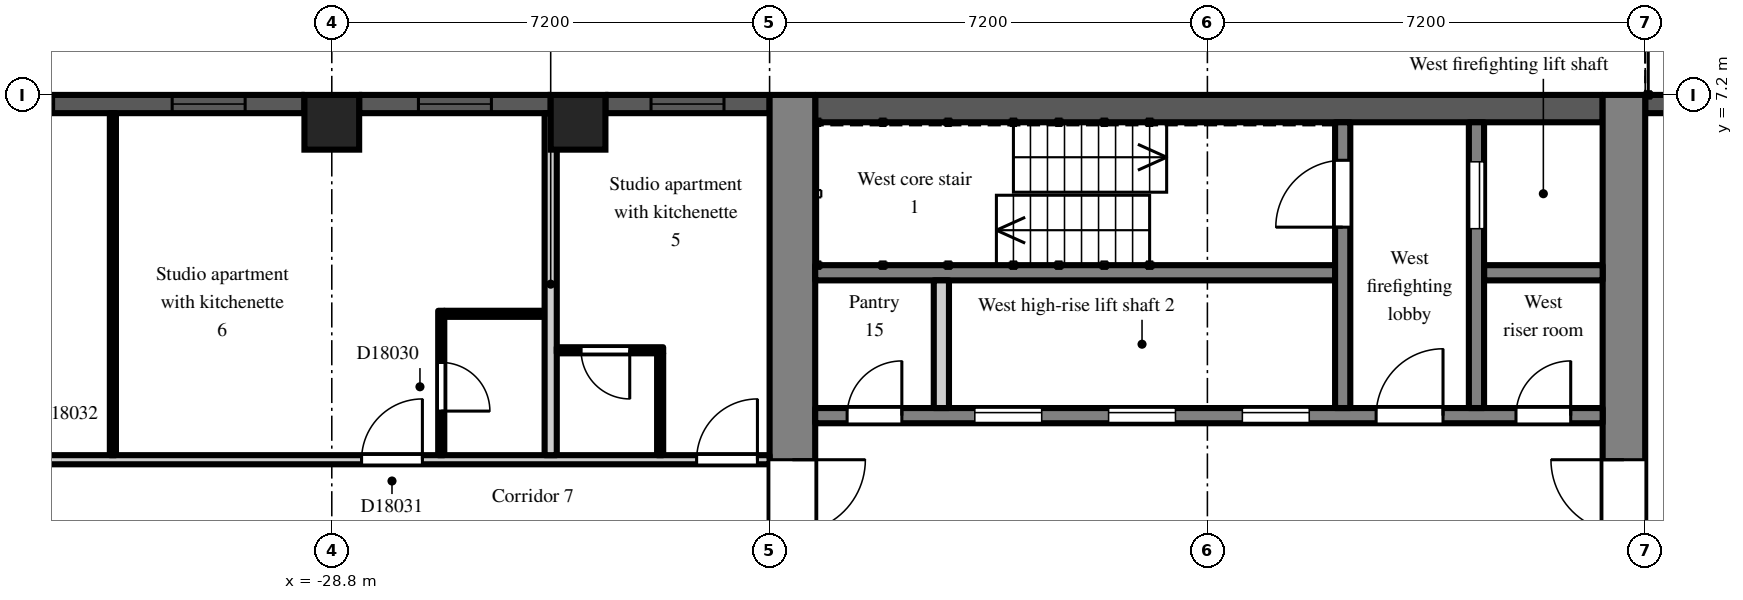
"""IFC4 building model, lengths in metres.
Left out: names, types, materials, properties, quantities, classifications, styles, units other than length and angle.
Written with IfcOpenShell. Run it as: python <this file> out.ifc"""

import sys

from ifc_helpers import new_model, si_unit, direction, frame, frame_2d, origin, origin_2d, place, context, subcontext, project, spatial, rectangle, extrude, element, fill, save


model = new_model("IFC4")
c1 = context("Model", 3, precision=1e-05, world=origin(), true_north=direction((0.0, 1.0)))
c2 = subcontext(c1, "Body", "Model", "MODEL_VIEW")
j1 = project(units=[si_unit("LENGTHUNIT", "METRE"), si_unit("PLANEANGLEUNIT", "RADIAN")], contexts=[c1])
p1 = place(None, origin())
s1 = spatial("IfcSite", under=j1, at=p1, CompositionType="ELEMENT")
p2 = place(p1, origin())
s2 = spatial("IfcBuilding", under=s1, at=p2, CompositionType="ELEMENT")
p3 = place(p2, frame((0.0, 0.0, 123.3)))
s3 = spatial("IfcBuildingStorey", under=s2, at=p3, CompositionType="ELEMENT", Elevation=123.3)
for number, where, z_axis, x_axis in (
    (1, (-28.8, 6.75, 0.0), (0.0, 0.0, 1.0), (1.0, 0.0, 0.0)),
    (2, (-24.75, 6.75, 0.0), (0.0, 0.0, 1.0), (1.0, 0.0, 0.0)),
):
    element("IfcColumn", number, at=place(p3, frame(where, z_axis=z_axis, x_axis=x_axis)), inside=s3, PredefinedType="COLUMN", context=c2, shape_type="SweptSolid", body=[
        extrude(rectangle(XDim=0.9, YDim=0.9, at=origin_2d()), origin(), (0.0, 0.0, 1.0), 3.0),
    ])
p4 = place(p3, frame((-4.2, 7.05, 0.0), z_axis=(0.0, 0.0, 1.0), x_axis=(-1.0, 0.0, 0.0)))
e3 = element("IfcWall", 3, at=p4, inside=s3, PredefinedType="SOLIDWALL", context=c2, shape_type="SweptSolid", body=[
    extrude(rectangle(XDim=3.0, YDim=0.3, at=frame_2d((1.5, 0.0))), origin(), (0.0, 0.0, 1.0), 2.2),
])
p5 = place(p3, frame((-21.6, 7.05, 0.0), z_axis=(0.0, 0.0, 1.0), x_axis=(-1.0, 0.0, 0.0)))
e4 = element("IfcWall", 4, at=p5, inside=s3, PredefinedType="SOLIDWALL", context=c2, shape_type="SweptSolid", body=[
    extrude(rectangle(XDim=2.7, YDim=0.3, at=frame_2d((1.35, 0.0))), origin(), (0.0, 0.0, 1.0), 2.2),
])
p6 = place(p5, frame((0.75, 0.0, 0.2)))
e5 = element("IfcOpeningElement", 5, at=p6, cuts=e4, PredefinedType="OPENING", context=c2, shape_type="SweptSolid", body=[
    extrude(rectangle(XDim=1.2, YDim=1.85, at=frame_2d((0.6, 0.925))), frame((0.0, 0.16, 0.0), z_axis=(0.0, -1.0, 0.0), x_axis=(1.0, 0.0, 0.0)), (0.0, 0.0, 1.0), 0.32),
])
p7 = place(p3, frame((-25.2, 7.05, 0.0), z_axis=(0.0, 0.0, 1.0), x_axis=(-1.0, 0.0, 0.0)))
e6 = element("IfcWall", 6, at=p7, inside=s3, PredefinedType="SOLIDWALL", context=c2, shape_type="SweptSolid", body=[
    extrude(rectangle(XDim=3.15, YDim=0.3, at=frame_2d((1.575, 0.0))), origin(), (0.0, 0.0, 1.0), 2.2),
])
p8 = place(p7, frame((0.975, 0.0, 0.2)))
e7 = element("IfcOpeningElement", 7, at=p8, cuts=e6, PredefinedType="OPENING", context=c2, shape_type="SweptSolid", body=[
    extrude(rectangle(XDim=1.2, YDim=1.85, at=frame_2d((0.6, 0.925))), frame((0.0, 0.16, 0.0), z_axis=(0.0, -1.0, 0.0), x_axis=(1.0, 0.0, 0.0)), (0.0, 0.0, 1.0), 0.32),
])
p9 = place(p3, frame((-29.25, 7.05, 0.0), z_axis=(0.0, 0.0, 1.0), x_axis=(-1.0, 0.0, 0.0)))
e8 = element("IfcWall", 8, at=p9, inside=s3, PredefinedType="SOLIDWALL", context=c2, shape_type="SweptSolid", body=[
    extrude(rectangle(XDim=6.3, YDim=0.3, at=frame_2d((3.15, 0.0))), origin(), (0.0, 0.0, 1.0), 2.2),
])
p10 = place(p9, frame((0.975, 0.0, 0.2)))
e9 = element("IfcOpeningElement", 9, at=p10, cuts=e8, PredefinedType="OPENING", context=c2, shape_type="SweptSolid", body=[
    extrude(rectangle(XDim=1.2, YDim=1.85, at=frame_2d((0.6, 0.925))), frame((0.0, 0.16, 0.0), z_axis=(0.0, -1.0, 0.0), x_axis=(1.0, 0.0, 0.0)), (0.0, 0.0, 1.0), 0.32),
])
p11 = place(p9, frame((4.125, 0.0, 0.2)))
e10 = element("IfcOpeningElement", 10, at=p11, cuts=e8, PredefinedType="OPENING", context=c2, shape_type="SweptSolid", body=[
    extrude(rectangle(XDim=1.2, YDim=1.85, at=frame_2d((0.6, 0.925))), frame((0.0, 0.16, 0.0), z_axis=(0.0, -1.0, 0.0), x_axis=(1.0, 0.0, 0.0)), (0.0, 0.0, 1.0), 0.32),
])
p12 = place(p3, frame((-7.55, -7.2, 0.0), z_axis=(0.0, 0.0, 1.0), x_axis=(0.0, 1.0, 0.0)))
e11 = element("IfcWall", 11, at=p12, inside=s3, PredefinedType="SHEAR", context=c2, shape_type="SweptSolid", body=[
    extrude(rectangle(XDim=14.4, YDim=0.7, at=frame_2d((7.2, 0.0))), origin(), (0.0, 0.0, 1.0), 2.6),
])
p13 = place(p12, frame((6.0, 0.0, 0.0)))
e12 = element("IfcOpeningElement", 12, at=p13, cuts=e11, PredefinedType="OPENING", context=c2, shape_type="SweptSolid", body=[
    extrude(rectangle(XDim=2.4, YDim=2.2, at=frame_2d((1.2, 1.1))), frame((0.0, 0.36, 0.0), z_axis=(0.0, -1.0, 0.0), x_axis=(1.0, 0.0, 0.0)), (0.0, 0.0, 1.0), 0.72),
])
p14 = place(p3, frame((-21.225, -7.2, 0.0), z_axis=(0.0, 0.0, 1.0), x_axis=(0.0, 1.0, 0.0)))
e13 = element("IfcWall", 13, at=p14, inside=s3, PredefinedType="SHEAR", context=c2, shape_type="SweptSolid", body=[
    extrude(rectangle(XDim=14.4, YDim=0.75, at=frame_2d((7.2, 0.0))), origin(), (0.0, 0.0, 1.0), 2.6),
])
p15 = place(p14, frame((6.0, 0.0, 0.0)))
e14 = element("IfcOpeningElement", 14, at=p15, cuts=e13, PredefinedType="OPENING", context=c2, shape_type="SweptSolid", body=[
    extrude(rectangle(XDim=2.4, YDim=2.2, at=frame_2d((1.2, 1.1))), frame((0.0, 0.385, 0.0), z_axis=(0.0, -1.0, 0.0), x_axis=(1.0, 0.0, 0.0)), (0.0, 0.0, 1.0), 0.77),
])
p16 = place(p3, frame((-7.9, 6.975, 0.0), z_axis=(0.0, 0.0, 1.0), x_axis=(-1.0, 0.0, 0.0)))
e15 = element("IfcWall", 15, at=p16, inside=s3, PredefinedType="SHEAR", context=c2, shape_type="SweptSolid", body=[
    extrude(rectangle(XDim=12.95, YDim=0.45, at=frame_2d((6.475, 0.0))), origin(), (0.0, 0.0, 1.0), 2.6),
])
p17 = place(p3, frame((-7.9, 1.925, 0.0), z_axis=(0.0, 0.0, 1.0), x_axis=(-1.0, 0.0, 0.0)))
e16 = element("IfcWall", 16, at=p17, inside=s3, PredefinedType="SHEAR", context=c2, shape_type="SweptSolid", body=[
    extrude(rectangle(XDim=12.95, YDim=0.25, at=frame_2d((6.475, 0.0))), origin(), (0.0, 0.0, 1.0), 2.6),
])
p18 = place(p17, frame((4.825, 0.0, 0.0)))
e17 = element("IfcOpeningElement", 17, at=p18, cuts=e16, PredefinedType="OPENING", context=c2, shape_type="SweptSolid", body=[
    extrude(rectangle(XDim=1.1, YDim=2.1, at=frame_2d((0.55, 1.05))), frame((0.0, 0.135, 0.0), z_axis=(0.0, -1.0, 0.0), x_axis=(1.0, 0.0, 0.0)), (0.0, 0.0, 1.0), 0.27),
])
p19 = place(p17, frame((7.025, 0.0, 0.0)))
e18 = element("IfcOpeningElement", 18, at=p19, cuts=e16, PredefinedType="OPENING", context=c2, shape_type="SweptSolid", body=[
    extrude(rectangle(XDim=1.1, YDim=2.1, at=frame_2d((0.55, 1.05))), frame((0.0, 0.135, 0.0), z_axis=(0.0, -1.0, 0.0), x_axis=(1.0, 0.0, 0.0)), (0.0, 0.0, 1.0), 0.27),
])
p20 = place(p17, frame((9.225, 0.0, 0.0)))
e19 = element("IfcOpeningElement", 19, at=p20, cuts=e16, PredefinedType="OPENING", context=c2, shape_type="SweptSolid", body=[
    extrude(rectangle(XDim=1.1, YDim=2.1, at=frame_2d((0.55, 1.05))), frame((0.0, 0.135, 0.0), z_axis=(0.0, -1.0, 0.0), x_axis=(1.0, 0.0, 0.0)), (0.0, 0.0, 1.0), 0.27),
])
p21 = place(p17, frame((0.525, 0.0, 0.0)))
e20 = element("IfcOpeningElement", 20, at=p21, cuts=e16, PredefinedType="OPENING", context=c2, shape_type="SweptSolid", body=[
    extrude(rectangle(XDim=0.9, YDim=2.1, at=frame_2d((0.45, 1.05))), frame((0.0, 0.135, 0.0), z_axis=(0.0, -1.0, 0.0), x_axis=(1.0, 0.0, 0.0)), (0.0, 0.0, 1.0), 0.27),
])
p22 = place(p17, frame((2.625, 0.0, 0.0)))
e21 = element("IfcOpeningElement", 21, at=p22, cuts=e16, PredefinedType="OPENING", context=c2, shape_type="SweptSolid", body=[
    extrude(rectangle(XDim=1.1, YDim=2.1, at=frame_2d((0.55, 1.05))), frame((0.0, 0.135, 0.0), z_axis=(0.0, -1.0, 0.0), x_axis=(1.0, 0.0, 0.0)), (0.0, 0.0, 1.0), 0.27),
])
p23 = place(p17, frame((11.525, 0.0, 0.0)))
e22 = element("IfcOpeningElement", 22, at=p23, cuts=e16, PredefinedType="OPENING", context=c2, shape_type="SweptSolid", body=[
    extrude(rectangle(XDim=0.9, YDim=2.1, at=frame_2d((0.45, 1.05))), frame((0.0, 0.135, 0.0), z_axis=(0.0, -1.0, 0.0), x_axis=(1.0, 0.0, 0.0)), (0.0, 0.0, 1.0), 0.27),
])
p24 = place(p3, frame((-7.9, 4.275, 0.0), z_axis=(0.0, 0.0, 1.0), x_axis=(-1.0, 0.0, 0.0)))
e23 = element("IfcWall", 23, at=p24, inside=s3, PredefinedType="SHEAR", context=c2, shape_type="SweptSolid", body=[
    extrude(rectangle(XDim=1.95, YDim=0.25, at=frame_2d((0.975, 0.0))), origin(), (0.0, 0.0, 1.0), 2.6),
])
p25 = place(p3, frame((-12.3, 4.275, 0.0), z_axis=(0.0, 0.0, 1.0), x_axis=(-1.0, 0.0, 0.0)))
e24 = element("IfcWall", 24, at=p25, inside=s3, PredefinedType="SHEAR", context=c2, shape_type="SweptSolid", body=[
    extrude(rectangle(XDim=8.55, YDim=0.25, at=frame_2d((4.275, 0.0))), origin(), (0.0, 0.0, 1.0), 2.6),
])
p26 = place(p3, frame((-9.975, 2.05, 0.0), z_axis=(0.0, 0.0, 1.0), x_axis=(0.0, 1.0, 0.0)))
e25 = element("IfcWall", 25, at=p26, inside=s3, PredefinedType="SHEAR", context=c2, shape_type="SweptSolid", body=[
    extrude(rectangle(XDim=4.7, YDim=0.25, at=frame_2d((2.35, 0.0))), origin(), (0.0, 0.0, 1.0), 2.6),
])
p27 = place(p26, frame((2.95, 0.0, 0.0)))
e26 = element("IfcOpeningElement", 26, at=p27, cuts=e25, PredefinedType="OPENING", context=c2, shape_type="SweptSolid", body=[
    extrude(rectangle(XDim=1.1, YDim=2.1, at=frame_2d((0.55, 1.05))), frame((0.0, 0.135, 0.0), z_axis=(0.0, -1.0, 0.0), x_axis=(1.0, 0.0, 0.0)), (0.0, 0.0, 1.0), 0.27),
])
p28 = place(p3, frame((-12.175, 2.05, 0.0), z_axis=(0.0, 0.0, 1.0), x_axis=(0.0, 1.0, 0.0)))
e27 = element("IfcWall", 27, at=p28, inside=s3, PredefinedType="SHEAR", context=c2, shape_type="SweptSolid", body=[
    extrude(rectangle(XDim=4.7, YDim=0.25, at=frame_2d((2.35, 0.0))), origin(), (0.0, 0.0, 1.0), 2.6),
])
p29 = place(p28, frame((2.975, 0.0, 0.0)))
e28 = element("IfcOpeningElement", 28, at=p29, cuts=e27, PredefinedType="OPENING", context=c2, shape_type="SweptSolid", body=[
    extrude(rectangle(XDim=1.1, YDim=2.1, at=frame_2d((0.55, 1.05))), frame((0.0, 0.135, 0.0), z_axis=(0.0, -1.0, 0.0), x_axis=(1.0, 0.0, 0.0)), (0.0, 0.0, 1.0), 0.27),
])
p30 = place(p3, frame((-18.775, 2.05, 0.0), z_axis=(0.0, 0.0, 1.0), x_axis=(0.0, 1.0, 0.0)))
e29 = element("IfcWall", 29, at=p30, inside=s3, PredefinedType="PARTITIONING", context=c2, shape_type="SweptSolid", body=[
    extrude(rectangle(XDim=2.1, YDim=0.25, at=frame_2d((1.05, 0.0))), origin(), (0.0, 0.0, 1.0), 2.6),
])
p31 = place(p3, frame((-36.5, 1.2, 0.0), z_axis=(0.0, 0.0, 1.0), x_axis=(1.0, 0.0, 0.0)))
e30 = element("IfcWall", 30, at=p31, inside=s3, PredefinedType="PARTITIONING", context=c2, shape_type="SweptSolid", body=[
    extrude(rectangle(XDim=14.9, YDim=0.15, at=frame_2d((7.45, 0.0))), origin(), (0.0, 0.0, 1.0), 2.6),
])
p32 = place(p31, frame((13.7, 0.0, 0.0)))
e31 = element("IfcOpeningElement", 31, at=p32, cuts=e30, PredefinedType="OPENING", context=c2, shape_type="SweptSolid", body=[
    extrude(rectangle(XDim=1.0, YDim=2.1, at=frame_2d((0.5, 1.05))), frame((0.0, 0.085, 0.0), z_axis=(0.0, -1.0, 0.0), x_axis=(1.0, 0.0, 0.0)), (0.0, 0.0, 1.0), 0.17),
])
p33 = place(p31, frame((8.19, 0.0, 0.0)))
e32 = element("IfcOpeningElement", 32, at=p33, cuts=e30, PredefinedType="OPENING", context=c2, shape_type="SweptSolid", body=[
    extrude(rectangle(XDim=1.0, YDim=2.1, at=frame_2d((0.5, 1.05))), frame((0.0, 0.085, 0.0), z_axis=(0.0, -1.0, 0.0), x_axis=(1.0, 0.0, 0.0)), (0.0, 0.0, 1.0), 0.17),
])
p34 = place(p31, frame((1.15, 0.0, 0.0)))
e33 = element("IfcOpeningElement", 33, at=p34, cuts=e30, PredefinedType="OPENING", context=c2, shape_type="SweptSolid", body=[
    extrude(rectangle(XDim=1.8, YDim=2.1, at=frame_2d((0.9, 1.05))), frame((0.0, 0.085, 0.0), z_axis=(0.0, -1.0, 0.0), x_axis=(1.0, 0.0, 0.0)), (0.0, 0.0, 1.0), 0.17),
])
p35 = place(p3, frame((-32.4, 1.275, 0.0), z_axis=(0.0, 0.0, 1.0), x_axis=(0.0, 1.0, 0.0)))
e34 = element("IfcWall", 34, at=p35, inside=s3, PredefinedType="PARTITIONING", context=c2, shape_type="SweptSolid", body=[
    extrude(rectangle(XDim=5.625, YDim=0.1, at=frame_2d((2.812, 0.0))), origin(), (0.0, 0.0, 1.0), 2.6),
])
p36 = place(p3, frame((-27.0, 1.275, 0.0), z_axis=(0.0, 0.0, 1.0), x_axis=(0.0, 1.0, 0.0)))
e35 = element("IfcWall", 35, at=p36, inside=s3, PredefinedType="PARTITIONING", context=c2, shape_type="SweptSolid", body=[
    extrude(rectangle(XDim=2.375, YDim=0.1, at=frame_2d((1.188, 0.0))), origin(), (0.0, 0.0, 1.0), 2.6),
])
p37 = place(p36, frame((0.725, 0.0, 0.0)))
e36 = element("IfcOpeningElement", 36, at=p37, cuts=e35, PredefinedType="OPENING", context=c2, shape_type="SweptSolid", body=[
    extrude(rectangle(XDim=0.8, YDim=2.1, at=frame_2d((0.4, 1.05))), frame((0.0, 0.06, 0.0), z_axis=(0.0, -1.0, 0.0), x_axis=(1.0, 0.0, 0.0)), (0.0, 0.0, 1.0), 0.12),
])
p38 = place(p3, frame((-26.95, 3.6, 0.0), z_axis=(0.0, 0.0, 1.0), x_axis=(1.0, 0.0, 0.0)))
e37 = element("IfcWall", 37, at=p38, inside=s3, PredefinedType="PARTITIONING", context=c2, shape_type="SweptSolid", body=[
    extrude(rectangle(XDim=1.65, YDim=0.1, at=frame_2d((0.825, 0.0))), origin(), (0.0, 0.0, 1.0), 2.6),
])
p39 = place(p3, frame((-25.2, 1.275, 0.0), z_axis=(0.0, 0.0, 1.0), x_axis=(0.0, 1.0, 0.0)))
e38 = element("IfcWall", 38, at=p39, inside=s3, PredefinedType="PARTITIONING", context=c2, shape_type="SweptSolid", body=[
    extrude(rectangle(XDim=5.625, YDim=0.2, at=frame_2d((2.812, 0.0))), origin(), (0.0, 0.0, 1.0), 2.6),
])
p40 = place(p3, frame((-25.1, 3.0, 0.0), z_axis=(0.0, 0.0, 1.0), x_axis=(1.0, 0.0, 0.0)))
e39 = element("IfcWall", 39, at=p40, inside=s3, PredefinedType="PARTITIONING", context=c2, shape_type="SweptSolid", body=[
    extrude(rectangle(XDim=1.75, YDim=0.1, at=frame_2d((0.875, 0.0))), origin(), (0.0, 0.0, 1.0), 2.6),
])
p41 = place(p40, frame((0.4, 0.0, 0.0)))
e40 = element("IfcOpeningElement", 40, at=p41, cuts=e39, PredefinedType="OPENING", context=c2, shape_type="SweptSolid", body=[
    extrude(rectangle(XDim=0.8, YDim=2.1, at=frame_2d((0.4, 1.05))), frame((0.0, 0.06, 0.0), z_axis=(0.0, -1.0, 0.0), x_axis=(1.0, 0.0, 0.0)), (0.0, 0.0, 1.0), 0.12),
])
p42 = place(p3, frame((-23.4, 1.275, 0.0), z_axis=(0.0, 0.0, 1.0), x_axis=(0.0, 1.0, 0.0)))
e41 = element("IfcWall", 41, at=p42, inside=s3, PredefinedType="PARTITIONING", context=c2, shape_type="SweptSolid", body=[
    extrude(rectangle(XDim=1.675, YDim=0.1, at=frame_2d((0.837, 0.0))), origin(), (0.0, 0.0, 1.0), 2.6),
])
p43 = place(p6, origin())
e42 = element("IfcWindow", 42, at=p43, inside=s3, PartitioningType="SINGLE_PANEL", PredefinedType="WINDOW", context=c2, shape_type="SweptSolid", body=[
    extrude(rectangle(XDim=1.2, YDim=1.85, at=frame_2d((0.6, 0.925))), frame((0.0, 0.03, 0.0), z_axis=(0.0, -1.0, 0.0), x_axis=(1.0, 0.0, 0.0)), (0.0, 0.0, 1.0), 0.06),
])
fill(e5, e42)
p44 = place(p8, origin())
e43 = element("IfcWindow", 43, at=p44, inside=s3, PartitioningType="SINGLE_PANEL", PredefinedType="WINDOW", context=c2, shape_type="SweptSolid", body=[
    extrude(rectangle(XDim=1.2, YDim=1.85, at=frame_2d((0.6, 0.925))), frame((0.0, 0.03, 0.0), z_axis=(0.0, -1.0, 0.0), x_axis=(1.0, 0.0, 0.0)), (0.0, 0.0, 1.0), 0.06),
])
fill(e7, e43)
p45 = place(p10, origin())
e44 = element("IfcWindow", 44, at=p45, inside=s3, PartitioningType="SINGLE_PANEL", PredefinedType="WINDOW", context=c2, shape_type="SweptSolid", body=[
    extrude(rectangle(XDim=1.2, YDim=1.85, at=frame_2d((0.6, 0.925))), frame((0.0, 0.03, 0.0), z_axis=(0.0, -1.0, 0.0), x_axis=(1.0, 0.0, 0.0)), (0.0, 0.0, 1.0), 0.06),
])
fill(e9, e44)
p46 = place(p11, origin())
e45 = element("IfcWindow", 45, at=p46, inside=s3, PartitioningType="SINGLE_PANEL", PredefinedType="WINDOW", context=c2, shape_type="SweptSolid", body=[
    extrude(rectangle(XDim=1.2, YDim=1.85, at=frame_2d((0.6, 0.925))), frame((0.0, 0.03, 0.0), z_axis=(0.0, -1.0, 0.0), x_axis=(1.0, 0.0, 0.0)), (0.0, 0.0, 1.0), 0.06),
])
fill(e10, e45)
p47 = place(p18, origin())
e46 = element("IfcDoor", 46, at=p47, inside=s3, OperationType="SLIDING_TO_LEFT", PredefinedType="DOOR", context=c2, shape_type="SweptSolid", body=[
    extrude(rectangle(XDim=1.1, YDim=2.1, at=frame_2d((0.55, 1.05))), frame((0.0, 0.025, 0.0), z_axis=(0.0, -1.0, 0.0), x_axis=(1.0, 0.0, 0.0)), (0.0, 0.0, 1.0), 0.05),
])
fill(e17, e46)
p48 = place(p19, origin())
e47 = element("IfcDoor", 47, at=p48, inside=s3, OperationType="SLIDING_TO_LEFT", PredefinedType="DOOR", context=c2, shape_type="SweptSolid", body=[
    extrude(rectangle(XDim=1.1, YDim=2.1, at=frame_2d((0.55, 1.05))), frame((0.0, 0.025, 0.0), z_axis=(0.0, -1.0, 0.0), x_axis=(1.0, 0.0, 0.0)), (0.0, 0.0, 1.0), 0.05),
])
fill(e18, e47)
p49 = place(p20, origin())
e48 = element("IfcDoor", 48, at=p49, inside=s3, OperationType="SLIDING_TO_LEFT", PredefinedType="DOOR", context=c2, shape_type="SweptSolid", body=[
    extrude(rectangle(XDim=1.1, YDim=2.1, at=frame_2d((0.55, 1.05))), frame((0.0, 0.025, 0.0), z_axis=(0.0, -1.0, 0.0), x_axis=(1.0, 0.0, 0.0)), (0.0, 0.0, 1.0), 0.05),
])
fill(e19, e48)
p50 = place(p27, origin())
e49 = element("IfcDoor", 49, at=p50, inside=s3, OperationType="SLIDING_TO_LEFT", PredefinedType="DOOR", context=c2, shape_type="SweptSolid", body=[
    extrude(rectangle(XDim=1.1, YDim=2.1, at=frame_2d((0.55, 1.05))), frame((0.0, 0.025, 0.0), z_axis=(0.0, -1.0, 0.0), x_axis=(1.0, 0.0, 0.0)), (0.0, 0.0, 1.0), 0.05),
])
fill(e26, e49)
p51 = place(p29, origin())
e50 = element("IfcDoor", 50, at=p51, inside=s3, OperationType="SINGLE_SWING_LEFT", PredefinedType="DOOR", context=c2, shape_type="SweptSolid", body=[
    extrude(rectangle(XDim=1.1, YDim=2.1, at=frame_2d((0.55, 1.05))), frame((0.0, 0.025, 0.0), z_axis=(0.0, -1.0, 0.0), x_axis=(1.0, 0.0, 0.0)), (0.0, 0.0, 1.0), 0.05),
])
fill(e28, e50)
p52 = place(p21, frame((0.9, 0.0, 0.0), z_axis=(0.0, 0.0, 1.0), x_axis=(-1.0, 0.0, 0.0)))
e51 = element("IfcDoor", 51, at=p52, inside=s3, OperationType="SINGLE_SWING_RIGHT", PredefinedType="DOOR", context=c2, shape_type="SweptSolid", body=[
    extrude(rectangle(XDim=0.9, YDim=2.1, at=frame_2d((0.45, 1.05))), frame((0.0, 0.025, 0.0), z_axis=(0.0, -1.0, 0.0), x_axis=(1.0, 0.0, 0.0)), (0.0, 0.0, 1.0), 0.05),
])
fill(e20, e51)
p53 = place(p22, frame((1.1, 0.0, 0.0), z_axis=(0.0, 0.0, 1.0), x_axis=(-1.0, 0.0, 0.0)))
e52 = element("IfcDoor", 52, at=p53, inside=s3, OperationType="SINGLE_SWING_RIGHT", PredefinedType="DOOR", context=c2, shape_type="SweptSolid", body=[
    extrude(rectangle(XDim=1.1, YDim=2.1, at=frame_2d((0.55, 1.05))), frame((0.0, 0.025, 0.0), z_axis=(0.0, -1.0, 0.0), x_axis=(1.0, 0.0, 0.0)), (0.0, 0.0, 1.0), 0.05),
])
fill(e21, e52)
p54 = place(p13, origin())
e53 = element("IfcDoor", 53, at=p54, inside=s3, OperationType="DOUBLE_DOOR_DOUBLE_SWING", PredefinedType="DOOR", context=c2, shape_type="SweptSolid", body=[
    extrude(rectangle(XDim=2.4, YDim=2.2, at=frame_2d((1.2, 1.1))), frame((0.0, 0.025, 0.0), z_axis=(0.0, -1.0, 0.0), x_axis=(1.0, 0.0, 0.0)), (0.0, 0.0, 1.0), 0.05),
])
fill(e12, e53)
p55 = place(p15, frame((2.4, 0.0, 0.0), z_axis=(0.0, 0.0, 1.0), x_axis=(-1.0, 0.0, 0.0)))
e54 = element("IfcDoor", 54, at=p55, inside=s3, OperationType="DOUBLE_DOOR_DOUBLE_SWING", PredefinedType="DOOR", context=c2, shape_type="SweptSolid", body=[
    extrude(rectangle(XDim=2.4, YDim=2.2, at=frame_2d((1.2, 1.1))), frame((0.0, 0.025, 0.0), z_axis=(0.0, -1.0, 0.0), x_axis=(1.0, 0.0, 0.0)), (0.0, 0.0, 1.0), 0.05),
])
fill(e14, e54)
p56 = place(p23, frame((0.9, 0.0, 0.0), z_axis=(0.0, 0.0, 1.0), x_axis=(-1.0, 0.0, 0.0)))
e55 = element("IfcDoor", 55, at=p56, inside=s3, OperationType="SINGLE_SWING_RIGHT", PredefinedType="DOOR", context=c2, shape_type="SweptSolid", body=[
    extrude(rectangle(XDim=0.9, YDim=2.1, at=frame_2d((0.45, 1.05))), frame((0.0, 0.025, 0.0), z_axis=(0.0, -1.0, 0.0), x_axis=(1.0, 0.0, 0.0)), (0.0, 0.0, 1.0), 0.05),
])
fill(e22, e55)
p57 = place(p41, frame((0.8, 0.0, 0.0), z_axis=(0.0, 0.0, 1.0), x_axis=(-1.0, 0.0, 0.0)))
e56 = element("IfcDoor", 56, at=p57, inside=s3, OperationType="SINGLE_SWING_LEFT", PredefinedType="DOOR", context=c2, shape_type="SweptSolid", body=[
    extrude(rectangle(XDim=0.8, YDim=2.1, at=frame_2d((0.4, 1.05))), frame((0.0, 0.025, 0.0), z_axis=(0.0, -1.0, 0.0), x_axis=(1.0, 0.0, 0.0)), (0.0, 0.0, 1.0), 0.05),
])
fill(e40, e56)
p58 = place(p32, origin())
e57 = element("IfcDoor", 57, at=p58, inside=s3, OperationType="SINGLE_SWING_RIGHT", PredefinedType="DOOR", context=c2, shape_type="SweptSolid", body=[
    extrude(rectangle(XDim=1.0, YDim=2.1, at=frame_2d((0.5, 1.05))), frame((0.0, 0.025, 0.0), z_axis=(0.0, -1.0, 0.0), x_axis=(1.0, 0.0, 0.0)), (0.0, 0.0, 1.0), 0.05),
])
fill(e31, e57)
p59 = place(p37, frame((0.8, 0.0, 0.0), z_axis=(0.0, 0.0, 1.0), x_axis=(-1.0, 0.0, 0.0)))
e58 = element("IfcDoor", 58, at=p59, inside=s3, OperationType="SINGLE_SWING_RIGHT", PredefinedType="DOOR", context=c2, shape_type="SweptSolid", body=[
    extrude(rectangle(XDim=0.8, YDim=2.1, at=frame_2d((0.4, 1.05))), frame((0.0, 0.025, 0.0), z_axis=(0.0, -1.0, 0.0), x_axis=(1.0, 0.0, 0.0)), (0.0, 0.0, 1.0), 0.05),
])
fill(e36, e58)
p60 = place(p33, origin())
e59 = element("IfcDoor", 59, at=p60, inside=s3, OperationType="SINGLE_SWING_RIGHT", PredefinedType="DOOR", context=c2, shape_type="SweptSolid", body=[
    extrude(rectangle(XDim=1.0, YDim=2.1, at=frame_2d((0.5, 1.05))), frame((0.0, 0.025, 0.0), z_axis=(0.0, -1.0, 0.0), x_axis=(1.0, 0.0, 0.0)), (0.0, 0.0, 1.0), 0.05),
])
fill(e32, e59)
save(model, sys.argv[1])
